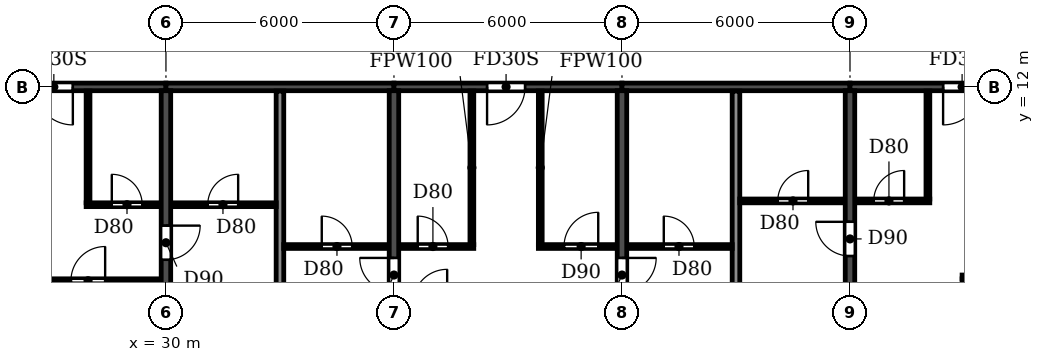
"""IFC4 building model, lengths in metres.
Left out: names, types, materials, properties, quantities, classifications, styles, units other than length and angle.
Written with IfcOpenShell. Run it as: python <this file> out.ifc"""

import sys

from ifc_helpers import new_model, si_unit, direction, frame, frame_2d, origin, place, context, subcontext, project, spatial, rectangle, extrude, element, fill, save


model = new_model("IFC4")
c1 = context("Model", 3, precision=1e-05, world=origin(), true_north=direction((0.0, 1.0)))
c2 = subcontext(c1, "Body", "Model", "MODEL_VIEW")
j1 = project(units=[si_unit("LENGTHUNIT", "METRE"), si_unit("PLANEANGLEUNIT", "RADIAN")], contexts=[c1])
p1 = place(None, origin())
s1 = spatial("IfcSite", under=j1, at=p1, CompositionType="ELEMENT")
p2 = place(p1, origin())
s2 = spatial("IfcBuilding", under=s1, at=p2, CompositionType="ELEMENT")
p3 = place(p2, frame((0.0, 0.0, 231.3)))
s3 = spatial("IfcBuildingStorey", under=s2, at=p3, CompositionType="ELEMENT", Elevation=231.3)
p4 = place(p3, frame((30.0, 0.2, 0.0), z_axis=(0.0, 0.0, 1.0), x_axis=(0.0, 1.0, 0.0)))
e1 = element("IfcWall", 1, at=p4, inside=s3, PredefinedType="SHEAR", context=c2, shape_type="SweptSolid", body=[
    extrude(rectangle(XDim=11.7, YDim=0.25, at=frame_2d((5.85, 0.0))), origin(), (0.0, 0.0, 1.0), 3.08),
])
p5 = place(p4, frame((7.25, 0.0, 0.0)))
e2 = element("IfcOpeningElement", 2, at=p5, cuts=e1, PredefinedType="OPENING", context=c2, shape_type="SweptSolid", body=[
    extrude(rectangle(XDim=0.9, YDim=2.1, at=frame_2d((0.45, 1.05))), frame((0.0, 0.135, 0.0), z_axis=(0.0, -1.0, 0.0), x_axis=(1.0, 0.0, 0.0)), (0.0, 0.0, 1.0), 0.27),
])
p6 = place(p3, frame((36.0, 0.2, 0.0), z_axis=(0.0, 0.0, 1.0), x_axis=(0.0, 1.0, 0.0)))
e3 = element("IfcWall", 3, at=p6, inside=s3, PredefinedType="SHEAR", context=c2, shape_type="SweptSolid", body=[
    extrude(rectangle(XDim=11.7, YDim=0.25, at=frame_2d((5.85, 0.0))), origin(), (0.0, 0.0, 1.0), 3.08),
])
p7 = place(p6, frame((6.4, 0.0, 0.0)))
e4 = element("IfcOpeningElement", 4, at=p7, cuts=e3, PredefinedType="OPENING", context=c2, shape_type="SweptSolid", body=[
    extrude(rectangle(XDim=0.9, YDim=2.1, at=frame_2d((0.45, 1.05))), frame((0.0, 0.135, 0.0), z_axis=(0.0, -1.0, 0.0), x_axis=(1.0, 0.0, 0.0)), (0.0, 0.0, 1.0), 0.27),
])
p8 = place(p3, frame((42.0, 0.2, 0.0), z_axis=(0.0, 0.0, 1.0), x_axis=(0.0, 1.0, 0.0)))
e5 = element("IfcWall", 5, at=p8, inside=s3, PredefinedType="SHEAR", context=c2, shape_type="SweptSolid", body=[
    extrude(rectangle(XDim=11.7, YDim=0.25, at=frame_2d((5.85, 0.0))), origin(), (0.0, 0.0, 1.0), 3.08),
])
p9 = place(p8, frame((6.4, 0.0, 0.0)))
e6 = element("IfcOpeningElement", 6, at=p9, cuts=e5, PredefinedType="OPENING", context=c2, shape_type="SweptSolid", body=[
    extrude(rectangle(XDim=0.9, YDim=2.1, at=frame_2d((0.45, 1.05))), frame((0.0, 0.135, 0.0), z_axis=(0.0, -1.0, 0.0), x_axis=(1.0, 0.0, 0.0)), (0.0, 0.0, 1.0), 0.27),
])
p10 = place(p3, frame((48.0, 0.2, 0.0), z_axis=(0.0, 0.0, 1.0), x_axis=(0.0, 1.0, 0.0)))
e7 = element("IfcWall", 7, at=p10, inside=s3, PredefinedType="SHEAR", context=c2, shape_type="SweptSolid", body=[
    extrude(rectangle(XDim=11.7, YDim=0.25, at=frame_2d((5.85, 0.0))), origin(), (0.0, 0.0, 1.0), 3.08),
])
p11 = place(p10, frame((7.35, 0.0, 0.0)))
e8 = element("IfcOpeningElement", 8, at=p11, cuts=e7, PredefinedType="OPENING", context=c2, shape_type="SweptSolid", body=[
    extrude(rectangle(XDim=0.9, YDim=2.1, at=frame_2d((0.45, 1.05))), frame((0.0, 0.135, 0.0), z_axis=(0.0, -1.0, 0.0), x_axis=(1.0, 0.0, 0.0)), (0.0, 0.0, 1.0), 0.27),
])
p12 = place(p3, frame((24.0, 12.0, 0.0), z_axis=(0.0, 0.0, 1.0), x_axis=(1.0, 0.0, 0.0)))
e9 = element("IfcWall", 9, at=p12, inside=s3, PredefinedType="SHEAR", context=c2, shape_type="SweptSolid", body=[
    extrude(rectangle(XDim=6.0, YDim=0.2, at=frame_2d((3.0, 0.0))), origin(), (0.0, 0.0, 1.0), 2.48),
])
p13 = place(p12, frame((2.55, 0.0, 0.0)))
e10 = element("IfcOpeningElement", 10, at=p13, cuts=e9, PredefinedType="OPENING", context=c2, shape_type="SweptSolid", body=[
    extrude(rectangle(XDim=1.0, YDim=2.1, at=frame_2d((0.5, 1.05))), frame((0.0, 0.11, 0.0), z_axis=(0.0, -1.0, 0.0), x_axis=(1.0, 0.0, 0.0)), (0.0, 0.0, 1.0), 0.22),
])
p14 = place(p3, frame((30.0, 12.0, 0.0), z_axis=(0.0, 0.0, 1.0), x_axis=(1.0, 0.0, 0.0)))
e11 = element("IfcWall", 11, at=p14, inside=s3, PredefinedType="SHEAR", context=c2, shape_type="SweptSolid", body=[
    extrude(rectangle(XDim=6.0, YDim=0.2, at=frame_2d((3.0, 0.0))), origin(), (0.0, 0.0, 1.0), 2.48),
])
p15 = place(p3, frame((36.0, 12.0, 0.0), z_axis=(0.0, 0.0, 1.0), x_axis=(1.0, 0.0, 0.0)))
e12 = element("IfcWall", 12, at=p15, inside=s3, PredefinedType="SHEAR", context=c2, shape_type="SweptSolid", body=[
    extrude(rectangle(XDim=6.0, YDim=0.2, at=frame_2d((3.0, 0.0))), origin(), (0.0, 0.0, 1.0), 2.48),
])
p16 = place(p15, frame((2.45, 0.0, 0.0)))
e13 = element("IfcOpeningElement", 13, at=p16, cuts=e12, PredefinedType="OPENING", context=c2, shape_type="SweptSolid", body=[
    extrude(rectangle(XDim=1.0, YDim=2.1, at=frame_2d((0.5, 1.05))), frame((0.0, 0.11, 0.0), z_axis=(0.0, -1.0, 0.0), x_axis=(1.0, 0.0, 0.0)), (0.0, 0.0, 1.0), 0.22),
])
p17 = place(p3, frame((42.0, 12.0, 0.0), z_axis=(0.0, 0.0, 1.0), x_axis=(1.0, 0.0, 0.0)))
e14 = element("IfcWall", 14, at=p17, inside=s3, PredefinedType="SHEAR", context=c2, shape_type="SweptSolid", body=[
    extrude(rectangle(XDim=6.0, YDim=0.2, at=frame_2d((3.0, 0.0))), origin(), (0.0, 0.0, 1.0), 2.48),
])
p18 = place(p3, frame((48.0, 12.0, 0.0), z_axis=(0.0, 0.0, 1.0), x_axis=(1.0, 0.0, 0.0)))
e15 = element("IfcWall", 15, at=p18, inside=s3, PredefinedType="SHEAR", context=c2, shape_type="SweptSolid", body=[
    extrude(rectangle(XDim=6.0, YDim=0.2, at=frame_2d((3.0, 0.0))), origin(), (0.0, 0.0, 1.0), 2.48),
])
p19 = place(p18, frame((2.45, 0.0, 0.0)))
e16 = element("IfcOpeningElement", 16, at=p19, cuts=e15, PredefinedType="OPENING", context=c2, shape_type="SweptSolid", body=[
    extrude(rectangle(XDim=1.0, YDim=2.1, at=frame_2d((0.5, 1.05))), frame((0.0, 0.11, 0.0), z_axis=(0.0, -1.0, 0.0), x_axis=(1.0, 0.0, 0.0)), (0.0, 0.0, 1.0), 0.22),
])
for number, where, z_axis, x_axis in (
    (17, (33.0, 0.06, 0.0), (0.0, 0.0, 1.0), (0.0, 1.0, 0.0)),
    (18, (45.0, 0.06, 0.0), (0.0, 0.0, 1.0), (0.0, 1.0, 0.0)),
):
    element("IfcWall", number, at=place(p3, frame(where, z_axis=z_axis, x_axis=x_axis)), inside=s3, PredefinedType="PARTITIONING", context=c2, shape_type="SweptSolid", body=[
        extrude(rectangle(XDim=11.83, YDim=0.2, at=frame_2d((5.915, 0.0))), origin(), (0.0, 0.0, 1.0), 3.08),
    ])
p20 = place(p3, frame((26.95, 6.9, 0.0), z_axis=(0.0, 0.0, 1.0), x_axis=(1.0, 0.0, 0.0)))
e19 = element("IfcWall", 19, at=p20, inside=s3, PredefinedType="PARTITIONING", context=c2, shape_type="SweptSolid", body=[
    extrude(rectangle(XDim=2.915, YDim=0.1, at=frame_2d((1.458, 0.0))), origin(), (0.0, 0.0, 1.0), 3.08),
])
p21 = place(p20, frame((0.55, 0.0, 0.0)))
e20 = element("IfcOpeningElement", 20, at=p21, cuts=e19, PredefinedType="OPENING", context=c2, shape_type="SweptSolid", body=[
    extrude(rectangle(XDim=0.9, YDim=2.1, at=frame_2d((0.45, 1.05))), frame((0.0, 0.06, 0.0), z_axis=(0.0, -1.0, 0.0), x_axis=(1.0, 0.0, 0.0)), (0.0, 0.0, 1.0), 0.12),
])
p22 = place(p3, frame((50.95, 7.0, 0.0), z_axis=(0.0, 0.0, 1.0), x_axis=(1.0, 0.0, 0.0)))
e21 = element("IfcWall", 21, at=p22, inside=s3, PredefinedType="PARTITIONING", context=c2, shape_type="SweptSolid", body=[
    extrude(rectangle(XDim=2.915, YDim=0.1, at=frame_2d((1.458, 0.0))), origin(), (0.0, 0.0, 1.0), 3.08),
])
p23 = place(p22, frame((0.55, 0.0, 0.0)))
e22 = element("IfcOpeningElement", 22, at=p23, cuts=e21, PredefinedType="OPENING", context=c2, shape_type="SweptSolid", body=[
    extrude(rectangle(XDim=0.9, YDim=2.1, at=frame_2d((0.45, 1.05))), frame((0.0, 0.06, 0.0), z_axis=(0.0, -1.0, 0.0), x_axis=(1.0, 0.0, 0.0)), (0.0, 0.0, 1.0), 0.12),
])
p24 = place(p3, frame((33.1, 7.8, 0.0), z_axis=(0.0, 0.0, 1.0), x_axis=(1.0, 0.0, 0.0)))
e23 = element("IfcWall", 23, at=p24, inside=s3, PredefinedType="PARTITIONING", context=c2, shape_type="SweptSolid", body=[
    extrude(rectangle(XDim=2.765, YDim=0.1, at=frame_2d((1.382, 0.0))), origin(), (0.0, 0.0, 1.0), 3.08),
])
p25 = place(p24, frame((1.0, 0.0, 0.0)))
e24 = element("IfcOpeningElement", 24, at=p25, cuts=e23, PredefinedType="OPENING", context=c2, shape_type="SweptSolid", body=[
    extrude(rectangle(XDim=0.8, YDim=2.1, at=frame_2d((0.4, 1.05))), frame((0.0, 0.06, 0.0), z_axis=(0.0, -1.0, 0.0), x_axis=(1.0, 0.0, 0.0)), (0.0, 0.0, 1.0), 0.12),
])
p26 = place(p3, frame((36.135, 7.8, 0.0), z_axis=(0.0, 0.0, 1.0), x_axis=(1.0, 0.0, 0.0)))
e25 = element("IfcWall", 25, at=p26, inside=s3, PredefinedType="PARTITIONING", context=c2, shape_type="SweptSolid", body=[
    extrude(rectangle(XDim=1.965, YDim=0.1, at=frame_2d((0.982, 0.0))), origin(), (0.0, 0.0, 1.0), 3.08),
])
p27 = place(p26, frame((0.49, 0.0, 0.0)))
e26 = element("IfcOpeningElement", 26, at=p27, cuts=e25, PredefinedType="OPENING", context=c2, shape_type="SweptSolid", body=[
    extrude(rectangle(XDim=0.8, YDim=2.1, at=frame_2d((0.4, 1.05))), frame((0.0, 0.06, 0.0), z_axis=(0.0, -1.0, 0.0), x_axis=(1.0, 0.0, 0.0)), (0.0, 0.0, 1.0), 0.12),
])
p28 = place(p3, frame((39.8, 7.8, 0.0), z_axis=(0.0, 0.0, 1.0), x_axis=(1.0, 0.0, 0.0)))
e27 = element("IfcWall", 27, at=p28, inside=s3, PredefinedType="PARTITIONING", context=c2, shape_type="SweptSolid", body=[
    extrude(rectangle(XDim=2.065, YDim=0.1, at=frame_2d((1.032, 0.0))), origin(), (0.0, 0.0, 1.0), 3.08),
])
p29 = place(p28, frame((0.675, 0.0, 0.0)))
e28 = element("IfcOpeningElement", 28, at=p29, cuts=e27, PredefinedType="OPENING", context=c2, shape_type="SweptSolid", body=[
    extrude(rectangle(XDim=0.9, YDim=2.1, at=frame_2d((0.45, 1.05))), frame((0.0, 0.06, 0.0), z_axis=(0.0, -1.0, 0.0), x_axis=(1.0, 0.0, 0.0)), (0.0, 0.0, 1.0), 0.12),
])
p30 = place(p3, frame((42.135, 7.8, 0.0), z_axis=(0.0, 0.0, 1.0), x_axis=(1.0, 0.0, 0.0)))
e29 = element("IfcWall", 29, at=p30, inside=s3, PredefinedType="PARTITIONING", context=c2, shape_type="SweptSolid", body=[
    extrude(rectangle(XDim=2.765, YDim=0.1, at=frame_2d((1.382, 0.0))), origin(), (0.0, 0.0, 1.0), 3.08),
])
p31 = place(p30, frame((0.965, 0.0, 0.0)))
e30 = element("IfcOpeningElement", 30, at=p31, cuts=e29, PredefinedType="OPENING", context=c2, shape_type="SweptSolid", body=[
    extrude(rectangle(XDim=0.8, YDim=2.1, at=frame_2d((0.4, 1.05))), frame((0.0, 0.06, 0.0), z_axis=(0.0, -1.0, 0.0), x_axis=(1.0, 0.0, 0.0)), (0.0, 0.0, 1.0), 0.12),
])
p32 = place(p3, frame((27.9, 8.9, 0.0), z_axis=(0.0, 0.0, 1.0), x_axis=(1.0, 0.0, 0.0)))
e31 = element("IfcWall", 31, at=p32, inside=s3, PredefinedType="PARTITIONING", context=c2, shape_type="SweptSolid", body=[
    extrude(rectangle(XDim=1.965, YDim=0.1, at=frame_2d((0.982, 0.0))), origin(), (0.0, 0.0, 1.0), 3.08),
])
p33 = place(p32, frame((0.675, 0.0, 0.0)))
e32 = element("IfcOpeningElement", 32, at=p33, cuts=e31, PredefinedType="OPENING", context=c2, shape_type="SweptSolid", body=[
    extrude(rectangle(XDim=0.8, YDim=2.1, at=frame_2d((0.4, 1.05))), frame((0.0, 0.06, 0.0), z_axis=(0.0, -1.0, 0.0), x_axis=(1.0, 0.0, 0.0)), (0.0, 0.0, 1.0), 0.12),
])
p34 = place(p3, frame((30.135, 8.9, 0.0), z_axis=(0.0, 0.0, 1.0), x_axis=(1.0, 0.0, 0.0)))
e33 = element("IfcWall", 33, at=p34, inside=s3, PredefinedType="PARTITIONING", context=c2, shape_type="SweptSolid", body=[
    extrude(rectangle(XDim=2.765, YDim=0.1, at=frame_2d((1.382, 0.0))), origin(), (0.0, 0.0, 1.0), 3.08),
])
p35 = place(p34, frame((0.965, 0.0, 0.0)))
e34 = element("IfcOpeningElement", 34, at=p35, cuts=e33, PredefinedType="OPENING", context=c2, shape_type="SweptSolid", body=[
    extrude(rectangle(XDim=0.8, YDim=2.1, at=frame_2d((0.4, 1.05))), frame((0.0, 0.06, 0.0), z_axis=(0.0, -1.0, 0.0), x_axis=(1.0, 0.0, 0.0)), (0.0, 0.0, 1.0), 0.12),
])
p36 = place(p3, frame((45.1, 9.0, 0.0), z_axis=(0.0, 0.0, 1.0), x_axis=(1.0, 0.0, 0.0)))
e35 = element("IfcWall", 35, at=p36, inside=s3, PredefinedType="PARTITIONING", context=c2, shape_type="SweptSolid", body=[
    extrude(rectangle(XDim=2.765, YDim=0.1, at=frame_2d((1.382, 0.0))), origin(), (0.0, 0.0, 1.0), 3.08),
])
p37 = place(p36, frame((1.0, 0.0, 0.0)))
e36 = element("IfcOpeningElement", 36, at=p37, cuts=e35, PredefinedType="OPENING", context=c2, shape_type="SweptSolid", body=[
    extrude(rectangle(XDim=0.8, YDim=2.1, at=frame_2d((0.4, 1.05))), frame((0.0, 0.06, 0.0), z_axis=(0.0, -1.0, 0.0), x_axis=(1.0, 0.0, 0.0)), (0.0, 0.0, 1.0), 0.12),
])
p38 = place(p3, frame((48.135, 9.0, 0.0), z_axis=(0.0, 0.0, 1.0), x_axis=(1.0, 0.0, 0.0)))
e37 = element("IfcWall", 37, at=p38, inside=s3, PredefinedType="PARTITIONING", context=c2, shape_type="SweptSolid", body=[
    extrude(rectangle(XDim=1.965, YDim=0.1, at=frame_2d((0.982, 0.0))), origin(), (0.0, 0.0, 1.0), 3.08),
])
p39 = place(p38, frame((0.49, 0.0, 0.0)))
e38 = element("IfcOpeningElement", 38, at=p39, cuts=e37, PredefinedType="OPENING", context=c2, shape_type="SweptSolid", body=[
    extrude(rectangle(XDim=0.8, YDim=2.1, at=frame_2d((0.4, 1.05))), frame((0.0, 0.06, 0.0), z_axis=(0.0, -1.0, 0.0), x_axis=(1.0, 0.0, 0.0)), (0.0, 0.0, 1.0), 0.12),
])
p40 = place(p3, frame((27.95, 8.95, 0.0), z_axis=(0.0, 0.0, 1.0), x_axis=(0.0, 1.0, 0.0)))
e39 = element("IfcWall", 39, at=p40, inside=s3, PredefinedType="PARTITIONING", context=c2, shape_type="SweptSolid", body=[
    extrude(rectangle(XDim=2.94, YDim=0.1, at=frame_2d((1.47, 0.0))), origin(), (0.0, 0.0, 1.0), 3.08),
])
for number, where, z_axis, x_axis in (
    (40, (38.05, 7.85, 0.0), (0.0, 0.0, 1.0), (0.0, 1.0, 0.0)),
    (41, (39.85, 7.85, 0.0), (0.0, 0.0, 1.0), (0.0, 1.0, 0.0)),
):
    element("IfcWall", number, at=place(p3, frame(where, z_axis=z_axis, x_axis=x_axis)), inside=s3, PredefinedType="PARTITIONING", context=c2, shape_type="SweptSolid", body=[
        extrude(rectangle(XDim=4.04, YDim=0.1, at=frame_2d((2.02, 0.0))), origin(), (0.0, 0.0, 1.0), 3.08),
    ])
p41 = place(p3, frame((50.05, 9.05, 0.0), z_axis=(0.0, 0.0, 1.0), x_axis=(0.0, 1.0, 0.0)))
e42 = element("IfcWall", 42, at=p41, inside=s3, PredefinedType="PARTITIONING", context=c2, shape_type="SweptSolid", body=[
    extrude(rectangle(XDim=2.84, YDim=0.1, at=frame_2d((1.42, 0.0))), origin(), (0.0, 0.0, 1.0), 3.08),
])
p42 = place(p3, frame((51.0, 0.06, 0.0), z_axis=(0.0, 0.0, 1.0), x_axis=(0.0, 1.0, 0.0)))
e43 = element("IfcWall", 43, at=p42, inside=s3, PredefinedType="PARTITIONING", context=c2, shape_type="SweptSolid", body=[
    extrude(rectangle(XDim=6.89, YDim=0.1, at=frame_2d((3.445, 0.0))), origin(), (0.0, 0.0, 1.0), 3.08),
])
p43 = place(p35, origin())
e44 = element("IfcDoor", 44, at=p43, inside=s3, OperationType="SINGLE_SWING_RIGHT", PredefinedType="DOOR", context=c2, shape_type="SweptSolid", body=[
    extrude(rectangle(XDim=0.8, YDim=2.1, at=frame_2d((0.4, 1.05))), frame((0.0, 0.025, 0.0), z_axis=(0.0, -1.0, 0.0), x_axis=(1.0, 0.0, 0.0)), (0.0, 0.0, 1.0), 0.05),
])
fill(e34, e44)
p44 = place(p13, frame((1.0, 0.0, 0.0), z_axis=(0.0, 0.0, 1.0), x_axis=(-1.0, 0.0, 0.0)))
e45 = element("IfcDoor", 45, at=p44, inside=s3, OperationType="SINGLE_SWING_LEFT", PredefinedType="DOOR", context=c2, shape_type="SweptSolid", body=[
    extrude(rectangle(XDim=1.0, YDim=2.1, at=frame_2d((0.5, 1.05))), frame((0.0, 0.025, 0.0), z_axis=(0.0, -1.0, 0.0), x_axis=(1.0, 0.0, 0.0)), (0.0, 0.0, 1.0), 0.05),
])
fill(e10, e45)
p45 = place(p21, origin())
e46 = element("IfcDoor", 46, at=p45, inside=s3, OperationType="SINGLE_SWING_RIGHT", PredefinedType="DOOR", context=c2, shape_type="SweptSolid", body=[
    extrude(rectangle(XDim=0.9, YDim=2.1, at=frame_2d((0.45, 1.05))), frame((0.0, 0.025, 0.0), z_axis=(0.0, -1.0, 0.0), x_axis=(1.0, 0.0, 0.0)), (0.0, 0.0, 1.0), 0.05),
])
fill(e20, e46)
p46 = place(p33, origin())
e47 = element("IfcDoor", 47, at=p46, inside=s3, OperationType="SINGLE_SWING_LEFT", PredefinedType="DOOR", context=c2, shape_type="SweptSolid", body=[
    extrude(rectangle(XDim=0.8, YDim=2.1, at=frame_2d((0.4, 1.05))), frame((0.0, 0.025, 0.0), z_axis=(0.0, -1.0, 0.0), x_axis=(1.0, 0.0, 0.0)), (0.0, 0.0, 1.0), 0.05),
])
fill(e32, e47)
p47 = place(p5, frame((0.9, 0.0, 0.0), z_axis=(0.0, 0.0, 1.0), x_axis=(-1.0, 0.0, 0.0)))
e48 = element("IfcDoor", 48, at=p47, inside=s3, OperationType="SINGLE_SWING_LEFT", PredefinedType="DOOR", context=c2, shape_type="SweptSolid", body=[
    extrude(rectangle(XDim=0.9, YDim=2.1, at=frame_2d((0.45, 1.05))), frame((0.0, 0.025, 0.0), z_axis=(0.0, -1.0, 0.0), x_axis=(1.0, 0.0, 0.0)), (0.0, 0.0, 1.0), 0.05),
])
fill(e2, e48)
p48 = place(p25, origin())
e49 = element("IfcDoor", 49, at=p48, inside=s3, OperationType="SINGLE_SWING_LEFT", PredefinedType="DOOR", context=c2, shape_type="SweptSolid", body=[
    extrude(rectangle(XDim=0.8, YDim=2.1, at=frame_2d((0.4, 1.05))), frame((0.0, 0.025, 0.0), z_axis=(0.0, -1.0, 0.0), x_axis=(1.0, 0.0, 0.0)), (0.0, 0.0, 1.0), 0.05),
])
fill(e24, e49)
p49 = place(p31, origin())
e50 = element("IfcDoor", 50, at=p49, inside=s3, OperationType="SINGLE_SWING_LEFT", PredefinedType="DOOR", context=c2, shape_type="SweptSolid", body=[
    extrude(rectangle(XDim=0.8, YDim=2.1, at=frame_2d((0.4, 1.05))), frame((0.0, 0.025, 0.0), z_axis=(0.0, -1.0, 0.0), x_axis=(1.0, 0.0, 0.0)), (0.0, 0.0, 1.0), 0.05),
])
fill(e30, e50)
p50 = place(p7, origin())
e51 = element("IfcDoor", 51, at=p50, inside=s3, OperationType="SINGLE_SWING_RIGHT", PredefinedType="DOOR", context=c2, shape_type="SweptSolid", body=[
    extrude(rectangle(XDim=0.9, YDim=2.1, at=frame_2d((0.45, 1.05))), frame((0.0, 0.025, 0.0), z_axis=(0.0, -1.0, 0.0), x_axis=(1.0, 0.0, 0.0)), (0.0, 0.0, 1.0), 0.05),
])
fill(e4, e51)
p51 = place(p27, origin())
e52 = element("IfcDoor", 52, at=p51, inside=s3, OperationType="SINGLE_SWING_LEFT", PredefinedType="DOOR", context=c2, shape_type="SweptSolid", body=[
    extrude(rectangle(XDim=0.8, YDim=2.1, at=frame_2d((0.4, 1.05))), frame((0.0, 0.025, 0.0), z_axis=(0.0, -1.0, 0.0), x_axis=(1.0, 0.0, 0.0)), (0.0, 0.0, 1.0), 0.05),
])
fill(e26, e52)
p52 = place(p16, frame((1.0, 0.0, 0.0), z_axis=(0.0, 0.0, 1.0), x_axis=(-1.0, 0.0, 0.0)))
e53 = element("IfcDoor", 53, at=p52, inside=s3, OperationType="SINGLE_SWING_RIGHT", PredefinedType="DOOR", context=c2, shape_type="SweptSolid", body=[
    extrude(rectangle(XDim=1.0, YDim=2.1, at=frame_2d((0.5, 1.05))), frame((0.0, 0.025, 0.0), z_axis=(0.0, -1.0, 0.0), x_axis=(1.0, 0.0, 0.0)), (0.0, 0.0, 1.0), 0.05),
])
fill(e13, e53)
p53 = place(p29, origin())
e54 = element("IfcDoor", 54, at=p53, inside=s3, OperationType="SINGLE_SWING_RIGHT", PredefinedType="DOOR", context=c2, shape_type="SweptSolid", body=[
    extrude(rectangle(XDim=0.9, YDim=2.1, at=frame_2d((0.45, 1.05))), frame((0.0, 0.025, 0.0), z_axis=(0.0, -1.0, 0.0), x_axis=(1.0, 0.0, 0.0)), (0.0, 0.0, 1.0), 0.05),
])
fill(e28, e54)
p54 = place(p9, frame((0.9, 0.0, 0.0), z_axis=(0.0, 0.0, 1.0), x_axis=(-1.0, 0.0, 0.0)))
e55 = element("IfcDoor", 55, at=p54, inside=s3, OperationType="SINGLE_SWING_LEFT", PredefinedType="DOOR", context=c2, shape_type="SweptSolid", body=[
    extrude(rectangle(XDim=0.9, YDim=2.1, at=frame_2d((0.45, 1.05))), frame((0.0, 0.025, 0.0), z_axis=(0.0, -1.0, 0.0), x_axis=(1.0, 0.0, 0.0)), (0.0, 0.0, 1.0), 0.05),
])
fill(e6, e55)
p55 = place(p37, origin())
e56 = element("IfcDoor", 56, at=p55, inside=s3, OperationType="SINGLE_SWING_RIGHT", PredefinedType="DOOR", context=c2, shape_type="SweptSolid", body=[
    extrude(rectangle(XDim=0.8, YDim=2.1, at=frame_2d((0.4, 1.05))), frame((0.0, 0.025, 0.0), z_axis=(0.0, -1.0, 0.0), x_axis=(1.0, 0.0, 0.0)), (0.0, 0.0, 1.0), 0.05),
])
fill(e36, e56)
p56 = place(p11, origin())
e57 = element("IfcDoor", 57, at=p56, inside=s3, OperationType="SINGLE_SWING_RIGHT", PredefinedType="DOOR", context=c2, shape_type="SweptSolid", body=[
    extrude(rectangle(XDim=0.9, YDim=2.1, at=frame_2d((0.45, 1.05))), frame((0.0, 0.025, 0.0), z_axis=(0.0, -1.0, 0.0), x_axis=(1.0, 0.0, 0.0)), (0.0, 0.0, 1.0), 0.05),
])
fill(e8, e57)
p57 = place(p39, origin())
e58 = element("IfcDoor", 58, at=p57, inside=s3, OperationType="SINGLE_SWING_RIGHT", PredefinedType="DOOR", context=c2, shape_type="SweptSolid", body=[
    extrude(rectangle(XDim=0.8, YDim=2.1, at=frame_2d((0.4, 1.05))), frame((0.0, 0.025, 0.0), z_axis=(0.0, -1.0, 0.0), x_axis=(1.0, 0.0, 0.0)), (0.0, 0.0, 1.0), 0.05),
])
fill(e38, e58)
p58 = place(p19, frame((1.0, 0.0, 0.0), z_axis=(0.0, 0.0, 1.0), x_axis=(-1.0, 0.0, 0.0)))
e59 = element("IfcDoor", 59, at=p58, inside=s3, OperationType="SINGLE_SWING_RIGHT", PredefinedType="DOOR", context=c2, shape_type="SweptSolid", body=[
    extrude(rectangle(XDim=1.0, YDim=2.1, at=frame_2d((0.5, 1.05))), frame((0.0, 0.025, 0.0), z_axis=(0.0, -1.0, 0.0), x_axis=(1.0, 0.0, 0.0)), (0.0, 0.0, 1.0), 0.05),
])
fill(e16, e59)
save(model, sys.argv[1])
